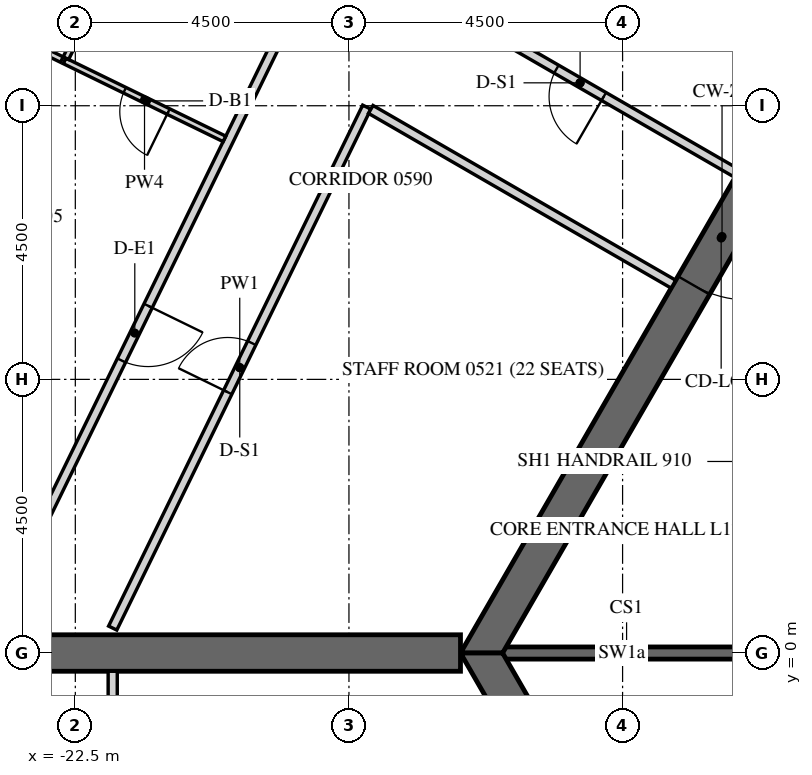
"""IFC4 building model, lengths in metres.
Left out: names, types, materials, properties, quantities, classifications, styles, units other than length and angle.
Written with IfcOpenShell. Run it as: python <this file> out.ifc"""

import sys

from ifc_helpers import new_model, si_unit, direction, frame, frame_2d, origin, place, context, subcontext, project, spatial, polyline, rectangle, outline, extrude, element, fill, save


model = new_model("IFC4")
c1 = context("Model", 3, precision=1e-05, world=origin(), true_north=direction((0.0, 1.0)))
c2 = subcontext(c1, "Body", "Model", "MODEL_VIEW")
j1 = project(units=[si_unit("LENGTHUNIT", "METRE"), si_unit("PLANEANGLEUNIT", "RADIAN")], contexts=[c1])
p1 = place(None, origin())
s1 = spatial("IfcSite", under=j1, at=p1, CompositionType="ELEMENT")
p2 = place(p1, origin())
s2 = spatial("IfcBuilding", under=s1, at=p2, CompositionType="ELEMENT")
p3 = place(p2, frame((0.0, 0.0, 80.4)))
s3 = spatial("IfcBuildingStorey", under=s2, at=p3, CompositionType="ELEMENT", Elevation=80.4)
p4 = place(p3, frame((-19.595, 27.633, -0.15), z_axis=(0.0, 0.0, 1.0), x_axis=(-0.438368285794, -0.898795441694, 0.0)))
e1 = element("IfcWall", 1, at=p4, inside=s3, PredefinedType="SOLIDWALL", context=c2, shape_type="SweptSolid", body=[
    extrude(outline(polyline([(-0.026, -0.275), (30.093, -0.275), (30.048, 0.275), (0.026, 0.275), (-0.026, -0.275)])), origin(), (0.0, 0.0, 1.0), 3.9),
])
p5 = place(p4, frame((1.236, 0.0, 1.05)))
e2 = element("IfcOpeningElement", 2, at=p5, cuts=e1, PredefinedType="OPENING", context=c2, shape_type="SweptSolid", body=[
    extrude(rectangle(XDim=2.4, YDim=2.4, at=frame_2d((1.2, 1.2))), frame((0.0, 0.285, 0.0), z_axis=(0.0, -1.0, 0.0), x_axis=(1.0, 0.0, 0.0)), (0.0, 0.0, 1.0), 0.57),
])
p6 = place(p4, frame((4.835, 0.0, 1.05)))
e3 = element("IfcOpeningElement", 3, at=p6, cuts=e1, PredefinedType="OPENING", context=c2, shape_type="SweptSolid", body=[
    extrude(rectangle(XDim=2.4, YDim=2.4, at=frame_2d((1.2, 1.2))), frame((0.0, 0.285, 0.0), z_axis=(0.0, -1.0, 0.0), x_axis=(1.0, 0.0, 0.0)), (0.0, 0.0, 1.0), 0.57),
])
p7 = place(p4, frame((8.436, 0.0, 1.05)))
e4 = element("IfcOpeningElement", 4, at=p7, cuts=e1, PredefinedType="OPENING", context=c2, shape_type="SweptSolid", body=[
    extrude(rectangle(XDim=2.4, YDim=2.4, at=frame_2d((1.2, 1.2))), frame((0.0, 0.285, 0.0), z_axis=(0.0, -1.0, 0.0), x_axis=(1.0, 0.0, 0.0)), (0.0, 0.0, 1.0), 0.57),
])
p8 = place(p4, frame((12.035, 0.0, 1.05)))
e5 = element("IfcOpeningElement", 5, at=p8, cuts=e1, PredefinedType="OPENING", context=c2, shape_type="SweptSolid", body=[
    extrude(rectangle(XDim=2.4, YDim=2.4, at=frame_2d((1.2, 1.2))), frame((0.0, 0.285, 0.0), z_axis=(0.0, -1.0, 0.0), x_axis=(1.0, 0.0, 0.0)), (0.0, 0.0, 1.0), 0.57),
])
p9 = place(p4, frame((15.635, 0.0, 1.05)))
e6 = element("IfcOpeningElement", 6, at=p9, cuts=e1, PredefinedType="OPENING", context=c2, shape_type="SweptSolid", body=[
    extrude(rectangle(XDim=2.4, YDim=2.4, at=frame_2d((1.2, 1.2))), frame((0.0, 0.285, 0.0), z_axis=(0.0, -1.0, 0.0), x_axis=(1.0, 0.0, 0.0)), (0.0, 0.0, 1.0), 0.57),
])
p10 = place(p4, frame((19.236, 0.0, 1.05)))
e7 = element("IfcOpeningElement", 7, at=p10, cuts=e1, PredefinedType="OPENING", context=c2, shape_type="SweptSolid", body=[
    extrude(rectangle(XDim=2.4, YDim=2.4, at=frame_2d((1.2, 1.2))), frame((0.0, 0.285, 0.0), z_axis=(0.0, -1.0, 0.0), x_axis=(1.0, 0.0, 0.0)), (0.0, 0.0, 1.0), 0.57),
])
p11 = place(p4, frame((22.835, 0.0, 1.05)))
e8 = element("IfcOpeningElement", 8, at=p11, cuts=e1, PredefinedType="OPENING", context=c2, shape_type="SweptSolid", body=[
    extrude(rectangle(XDim=2.4, YDim=2.4, at=frame_2d((1.2, 1.2))), frame((0.0, 0.285, 0.0), z_axis=(0.0, -1.0, 0.0), x_axis=(1.0, 0.0, 0.0)), (0.0, 0.0, 1.0), 0.57),
])
p12 = place(p4, frame((26.436, 0.0, 1.05)))
e9 = element("IfcOpeningElement", 9, at=p12, cuts=e1, PredefinedType="OPENING", context=c2, shape_type="SweptSolid", body=[
    extrude(rectangle(XDim=2.4, YDim=2.4, at=frame_2d((1.2, 1.2))), frame((0.0, 0.285, 0.0), z_axis=(0.0, -1.0, 0.0), x_axis=(1.0, 0.0, 0.0)), (0.0, 0.0, 1.0), 0.57),
])
p13 = place(p3, frame((-7.91, 13.7, -0.15), z_axis=(0.0, 0.0, 1.0), x_axis=(-0.499999880136, -0.866025472988, 0.0)))
e10 = element("IfcWall", 10, at=p13, inside=s3, PredefinedType="SHEAR", context=c2, shape_type="SweptSolid", body=[
    extrude(outline(polyline([(-0.173, -0.3), (15.993, -0.3), (15.646, 0.3), (0.173, 0.3), (-0.173, -0.3)])), origin(), (0.0, 0.0, 1.0), 3.9),
])
p14 = place(p13, frame((7.039, 0.0, 0.15)))
e11 = element("IfcOpeningElement", 11, at=p14, cuts=e10, PredefinedType="OPENING", context=c2, shape_type="SweptSolid", body=[
    extrude(rectangle(XDim=1.8, YDim=2.4, at=frame_2d((0.9, 1.2))), frame((0.0, 0.31, 0.0), z_axis=(0.0, -1.0, 0.0), x_axis=(1.0, 0.0, 0.0)), (0.0, 0.0, 1.0), 0.62),
])
p15 = place(p3, frame((-15.819, 0.0, -0.15), z_axis=(0.0, 0.0, 1.0), x_axis=(0.499999880136, -0.866025472988, 0.0)))
e12 = element("IfcWall", 12, at=p15, inside=s3, PredefinedType="SHEAR", context=c2, shape_type="SweptSolid", body=[
    extrude(outline(polyline([(-0.173, -0.3), (15.993, -0.3), (15.646, 0.3), (0.173, 0.3), (-0.173, -0.3)])), origin(), (0.0, 0.0, 1.0), 3.9),
])
p16 = place(p15, frame((6.981, 0.0, 0.15)))
e13 = element("IfcOpeningElement", 13, at=p16, cuts=e12, PredefinedType="OPENING", context=c2, shape_type="SweptSolid", body=[
    extrude(rectangle(XDim=1.8, YDim=2.4, at=frame_2d((0.9, 1.2))), frame((0.0, 0.31, 0.0), z_axis=(0.0, -1.0, 0.0), x_axis=(1.0, 0.0, 0.0)), (0.0, 0.0, 1.0), 0.62),
])
p17 = place(p3, frame((-16.166, 0.0, -0.15), z_axis=(0.0, 0.0, 1.0), x_axis=(-1.0, 0.0, 0.0)))
e14 = element("IfcWall", 14, at=p17, inside=s3, PredefinedType="SHEAR", context=c2, shape_type="SweptSolid", body=[
    extrude(rectangle(XDim=16.509, YDim=0.6, at=frame_2d((8.254, 0.0))), origin(), (0.0, 0.0, 1.0), 3.9),
])
p18 = place(p17, frame((7.354, 0.0, 0.15)))
e15 = element("IfcOpeningElement", 15, at=p18, cuts=e14, PredefinedType="OPENING", context=c2, shape_type="SweptSolid", body=[
    extrude(rectangle(XDim=1.8, YDim=2.4, at=frame_2d((0.9, 1.2))), frame((0.0, 0.31, 0.0), z_axis=(0.0, -1.0, 0.0), x_axis=(1.0, 0.0, 0.0)), (0.0, 0.0, 1.0), 0.62),
])
p19 = place(p3, frame((-11.547, 0.0, -0.15), z_axis=(0.0, 0.0, 1.0), x_axis=(-1.0, 0.0, 0.0)))
e16 = element("IfcWall", 16, at=p19, inside=s3, PredefinedType="SHEAR", context=c2, shape_type="SweptSolid", body=[
    extrude(rectangle(XDim=3.926, YDim=0.2, at=frame_2d((1.963, 0.0))), origin(), (0.0, 0.0, 1.0), 3.9),
])
p20 = place(p3, frame((-13.565, 21.575, 0.0), z_axis=(0.0, 0.0, 1.0), x_axis=(-0.438380787243, -0.898789344272, 0.0)))
e17 = element("IfcWall", 17, at=p20, inside=s3, PredefinedType="PARTITIONING", context=c2, shape_type="SweptSolid", body=[
    extrude(rectangle(XDim=21.668, YDim=0.15, at=frame_2d((10.834, 0.0))), origin(), (0.0, 0.0, 1.0), 2.988),
])
p21 = place(p20, frame((6.684, 0.0, 0.0)))
e18 = element("IfcOpeningElement", 18, at=p21, cuts=e17, PredefinedType="OPENING", context=c2, shape_type="SweptSolid", body=[
    extrude(rectangle(XDim=1.0, YDim=2.1, at=frame_2d((0.5, 1.05))), frame((0.0, 0.085, 0.0), z_axis=(0.0, -1.0, 0.0), x_axis=(1.0, 0.0, 0.0)), (0.0, 0.0, 1.0), 0.17),
])
p22 = place(p20, frame((17.651, 0.0, 0.0)))
e19 = element("IfcOpeningElement", 19, at=p22, cuts=e17, PredefinedType="OPENING", context=c2, shape_type="SweptSolid", body=[
    extrude(rectangle(XDim=1.0, YDim=2.1, at=frame_2d((0.5, 1.05))), frame((0.0, 0.085, 0.0), z_axis=(0.0, -1.0, 0.0), x_axis=(1.0, 0.0, 0.0)), (0.0, 0.0, 1.0), 0.17),
])
p23 = place(p3, frame((-11.614, 7.884, 0.0), z_axis=(0.0, 0.0, 1.0), x_axis=(-0.86603508376, 0.499983233416, 0.0)))
e20 = element("IfcWall", 20, at=p23, inside=s3, PredefinedType="PARTITIONING", context=c2, shape_type="SweptSolid", body=[
    extrude(rectangle(XDim=5.97, YDim=0.15, at=frame_2d((2.985, 0.0))), origin(), (0.0, 0.0, 1.0), 2.988),
])
p24 = place(p23, frame((2.535, 0.0, 0.0)))
e21 = element("IfcOpeningElement", 21, at=p24, cuts=e20, PredefinedType="OPENING", context=c2, shape_type="SweptSolid", body=[
    extrude(rectangle(XDim=0.9, YDim=2.1, at=frame_2d((0.45, 1.05))), frame((0.0, 0.085, 0.0), z_axis=(0.0, -1.0, 0.0), x_axis=(1.0, 0.0, 0.0)), (0.0, 0.0, 1.0), 0.17),
])
p25 = place(p3, frame((-21.885, 0.41, 0.0), z_axis=(0.0, 0.0, 1.0), x_axis=(0.43837064471, 0.898794291179, 0.0)))
e22 = element("IfcWall", 22, at=p25, inside=s3, PredefinedType="PARTITIONING", context=c2, shape_type="SweptSolid", body=[
    extrude(rectangle(XDim=9.532, YDim=0.15, at=frame_2d((4.766, 0.0))), origin(), (0.0, 0.0, 1.0), 2.988),
])
p26 = place(p25, frame((4.316, 0.0, 0.0)))
e23 = element("IfcOpeningElement", 23, at=p26, cuts=e22, PredefinedType="OPENING", context=c2, shape_type="SweptSolid", body=[
    extrude(rectangle(XDim=0.9, YDim=2.1, at=frame_2d((0.45, 1.05))), frame((0.0, 0.085, 0.0), z_axis=(0.0, -1.0, 0.0), x_axis=(1.0, 0.0, 0.0)), (0.0, 0.0, 1.0), 0.17),
])
p27 = place(p3, frame((-17.642, 8.94, 0.0), z_axis=(0.0, 0.0, 1.0), x_axis=(0.866017948234, -0.500012913169, 0.0)))
e24 = element("IfcWall", 24, at=p27, inside=s3, PredefinedType="PARTITIONING", context=c2, shape_type="SweptSolid", body=[
    extrude(rectangle(XDim=5.748, YDim=0.15, at=frame_2d((2.874, 0.0))), origin(), (0.0, 0.0, 1.0), 2.988),
])
p28 = place(p3, frame((-21.885, -1.644, 0.0), z_axis=(0.0, 0.0, 1.0), x_axis=(0.0, 1.0, 0.0)))
e25 = element("IfcWall", 25, at=p28, inside=s3, PredefinedType="PARTITIONING", context=c2, shape_type="SweptSolid", body=[
    extrude(rectangle(XDim=1.344, YDim=0.15, at=frame_2d((0.672, 0.0))), origin(), (0.0, 0.0, 1.0), 2.988),
])
p29 = place(p3, frame((-20.047, 8.455, 0.0), z_axis=(0.0, 0.0, 1.0), x_axis=(-0.89880694479, 0.438344699976, 0.0)))
e26 = element("IfcWall", 26, at=p29, inside=s3, PredefinedType="PARTITIONING", context=c2, shape_type="SweptSolid", body=[
    extrude(rectangle(XDim=2.925, YDim=0.1, at=frame_2d((1.462, 0.0))), origin(), (0.0, 0.0, 1.0), 2.988),
])
p30 = place(p29, frame((1.025, 0.0, 0.0)))
e27 = element("IfcOpeningElement", 27, at=p30, cuts=e26, PredefinedType="OPENING", context=c2, shape_type="SweptSolid", body=[
    extrude(rectangle(XDim=0.8, YDim=2.1, at=frame_2d((0.4, 1.05))), frame((0.0, 0.06, 0.0), z_axis=(0.0, -1.0, 0.0), x_axis=(1.0, 0.0, 0.0)), (0.0, 0.0, 1.0), 0.12),
])
p31 = place(p3, frame((-22.721, 9.759, 0.0), z_axis=(0.0, 0.0, 1.0), x_axis=(-0.898815368173, 0.438327427772, 0.0)))
e28 = element("IfcWall", 28, at=p31, inside=s3, PredefinedType="PARTITIONING", context=c2, shape_type="SweptSolid", body=[
    extrude(rectangle(XDim=1.95, YDim=0.1, at=frame_2d((0.975, 0.0))), origin(), (0.0, 0.0, 1.0), 2.988),
])
p32 = place(p31, frame((0.5, 0.0, 0.0)))
e29 = element("IfcOpeningElement", 29, at=p32, cuts=e28, PredefinedType="OPENING", context=c2, shape_type="SweptSolid", body=[
    extrude(rectangle(XDim=0.9, YDim=2.1, at=frame_2d((0.45, 1.05))), frame((0.0, 0.06, 0.0), z_axis=(0.0, -1.0, 0.0), x_axis=(1.0, 0.0, 0.0)), (0.0, 0.0, 1.0), 0.12),
])
p33 = place(p3, frame((-21.664, 11.813, 0.0), z_axis=(0.0, 0.0, 1.0), x_axis=(-0.438376807268, -0.898791285477, 0.0)))
e30 = element("IfcWall", 30, at=p33, inside=s3, PredefinedType="PARTITIONING", context=c2, shape_type="SweptSolid", body=[
    extrude(rectangle(XDim=2.26, YDim=0.1, at=frame_2d((1.13, 0.0))), origin(), (0.0, 0.0, 1.0), 2.988),
])
p34 = place(p14, origin())
e31 = element("IfcDoor", 31, at=p34, inside=s3, OperationType="DOUBLE_DOOR_SINGLE_SWING", PredefinedType="DOOR", context=c2, shape_type="SweptSolid", body=[
    extrude(rectangle(XDim=1.8, YDim=2.4, at=frame_2d((0.9, 1.2))), frame((0.0, 0.025, 0.0), z_axis=(0.0, -1.0, 0.0), x_axis=(1.0, 0.0, 0.0)), (0.0, 0.0, 1.0), 0.05),
])
fill(e11, e31)
p35 = place(p22, origin())
e32 = element("IfcDoor", 32, at=p35, inside=s3, OperationType="SINGLE_SWING_LEFT", PredefinedType="DOOR", context=c2, shape_type="SweptSolid", body=[
    extrude(rectangle(XDim=1.0, YDim=2.1, at=frame_2d((0.5, 1.05))), frame((0.0, 0.025, 0.0), z_axis=(0.0, -1.0, 0.0), x_axis=(1.0, 0.0, 0.0)), (0.0, 0.0, 1.0), 0.05),
])
fill(e19, e32)
p36 = place(p30, origin())
e33 = element("IfcDoor", 33, at=p36, inside=s3, OperationType="SINGLE_SWING_RIGHT", PredefinedType="DOOR", context=c2, shape_type="SweptSolid", body=[
    extrude(rectangle(XDim=0.8, YDim=2.1, at=frame_2d((0.4, 1.05))), frame((0.0, 0.025, 0.0), z_axis=(0.0, -1.0, 0.0), x_axis=(1.0, 0.0, 0.0)), (0.0, 0.0, 1.0), 0.05),
])
fill(e27, e33)
p37 = place(p24, origin())
e34 = element("IfcDoor", 34, at=p37, inside=s3, OperationType="SINGLE_SWING_RIGHT", PredefinedType="DOOR", context=c2, shape_type="SweptSolid", body=[
    extrude(rectangle(XDim=0.9, YDim=2.1, at=frame_2d((0.45, 1.05))), frame((0.0, 0.025, 0.0), z_axis=(0.0, -1.0, 0.0), x_axis=(1.0, 0.0, 0.0)), (0.0, 0.0, 1.0), 0.05),
])
fill(e21, e34)
p38 = place(p26, origin())
e35 = element("IfcDoor", 35, at=p38, inside=s3, OperationType="SINGLE_SWING_RIGHT", PredefinedType="DOOR", context=c2, shape_type="SweptSolid", body=[
    extrude(rectangle(XDim=0.9, YDim=2.1, at=frame_2d((0.45, 1.05))), frame((0.0, 0.025, 0.0), z_axis=(0.0, -1.0, 0.0), x_axis=(1.0, 0.0, 0.0)), (0.0, 0.0, 1.0), 0.05),
])
fill(e23, e35)
save(model, sys.argv[1])
